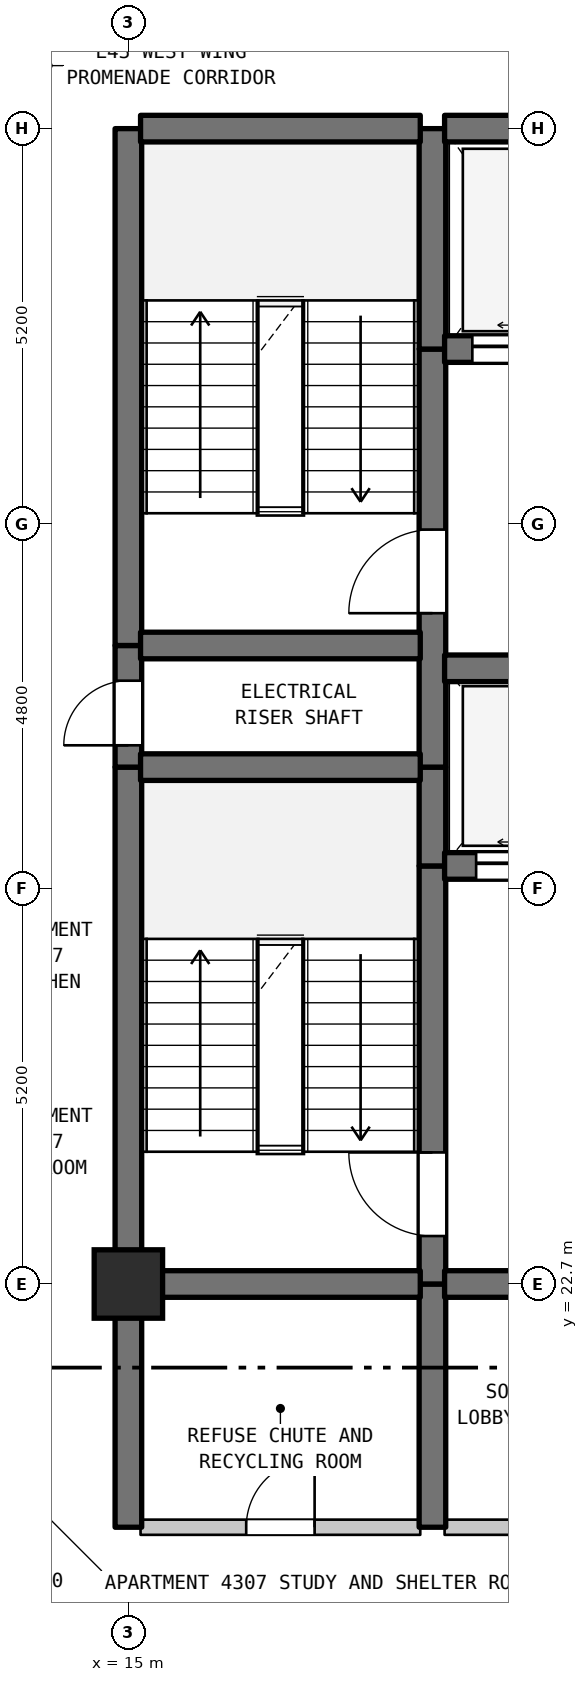
"""IFC4 building model, lengths in metres.
Left out: names, types, materials, properties, quantities, classifications, styles, units other than length and angle.
Written with IfcOpenShell. Run it as: python <this file> out.ifc"""

import sys

from ifc_helpers import new_model, si_unit, direction, frame, frame_2d, origin, origin_2d, place, context, subcontext, project, spatial, rectangle, extrude, element, fill, save


model = new_model("IFC4")
c1 = context("Model", 3, precision=1e-05, world=origin(), true_north=direction((0.0, 1.0)))
c2 = subcontext(c1, "Body", "Model", "MODEL_VIEW")
j1 = project(units=[si_unit("LENGTHUNIT", "METRE"), si_unit("PLANEANGLEUNIT", "RADIAN")], contexts=[c1])
p1 = place(None, origin())
s1 = spatial("IfcSite", under=j1, at=p1, CompositionType="ELEMENT")
p2 = place(p1, origin())
s2 = spatial("IfcBuilding", under=s1, at=p2, CompositionType="ELEMENT")
p3 = place(p2, frame((0.0, 0.0, 176.5)))
s3 = spatial("IfcBuildingStorey", under=s2, at=p3, CompositionType="ELEMENT", Elevation=176.5)
p4 = place(p3, frame((15.0, 22.7, 0.0), z_axis=(0.0, 0.0, 1.0), x_axis=(1.0, 0.0, 0.0)))
e1 = element("IfcColumn", 1, at=p4, inside=s3, PredefinedType="COLUMN", context=c2, shape_type="SweptSolid", body=[
    extrude(rectangle(XDim=0.9, YDim=0.9, at=origin_2d()), origin(), (0.0, 0.0, 1.0), 3.7),
])
p5 = place(p3, frame((15.0, 19.5, 0.0), z_axis=(0.0, 0.0, 1.0), x_axis=(0.0, 1.0, 0.0)))
e2 = element("IfcWall", 2, at=p5, inside=s3, PredefinedType="SHEAR", context=c2, shape_type="SweptSolid", body=[
    extrude(rectangle(XDim=3.2, YDim=0.35, at=frame_2d((1.6, 0.0))), origin(), (0.0, 0.0, 1.0), 3.39),
])
p6 = place(p3, frame((15.0, 22.7, 0.0), z_axis=(0.0, 0.0, 1.0), x_axis=(0.0, 1.0, 0.0)))
e3 = element("IfcWall", 3, at=p6, inside=s3, PredefinedType="SHEAR", context=c2, shape_type="SweptSolid", body=[
    extrude(rectangle(XDim=6.8, YDim=0.35, at=frame_2d((3.4, 0.0))), origin(), (0.0, 0.0, 1.0), 3.39),
])
p7 = place(p3, frame((15.0, 29.5, 0.0), z_axis=(0.0, 0.0, 1.0), x_axis=(0.0, 1.0, 0.0)))
e4 = element("IfcWall", 4, at=p7, inside=s3, PredefinedType="SHEAR", context=c2, shape_type="SweptSolid", body=[
    extrude(rectangle(XDim=1.6, YDim=0.35, at=frame_2d((0.8, 0.0))), origin(), (0.0, 0.0, 1.0), 3.39),
])
p8 = place(p7, frame((0.287, 0.0, 0.0)))
e5 = element("IfcOpeningElement", 5, at=p8, cuts=e4, PredefinedType="OPENING", context=c2, shape_type="SweptSolid", body=[
    extrude(rectangle(XDim=0.85, YDim=2.1, at=frame_2d((0.425, 1.05))), frame((0.0, 0.185, 0.0), z_axis=(0.0, -1.0, 0.0), x_axis=(1.0, 0.0, 0.0)), (0.0, 0.0, 1.0), 0.37),
])
p9 = place(p3, frame((15.0, 31.1, 0.0), z_axis=(0.0, 0.0, 1.0), x_axis=(0.0, 1.0, 0.0)))
e6 = element("IfcWall", 6, at=p9, inside=s3, PredefinedType="SHEAR", context=c2, shape_type="SweptSolid", body=[
    extrude(rectangle(XDim=6.8, YDim=0.35, at=frame_2d((3.4, 0.0))), origin(), (0.0, 0.0, 1.0), 3.39),
])
p10 = place(p3, frame((19.0, 19.5, 0.0), z_axis=(0.0, 0.0, 1.0), x_axis=(0.0, 1.0, 0.0)))
e7 = element("IfcWall", 7, at=p10, inside=s3, PredefinedType="SHEAR", context=c2, shape_type="SweptSolid", body=[
    extrude(rectangle(XDim=3.2, YDim=0.35, at=frame_2d((1.6, 0.0))), origin(), (0.0, 0.0, 1.0), 3.39),
])
p11 = place(p3, frame((19.0, 22.7, 0.0), z_axis=(0.0, 0.0, 1.0), x_axis=(0.0, 1.0, 0.0)))
e8 = element("IfcWall", 8, at=p11, inside=s3, PredefinedType="SHEAR", context=c2, shape_type="SweptSolid", body=[
    extrude(rectangle(XDim=5.5, YDim=0.35, at=frame_2d((2.75, 0.0))), origin(), (0.0, 0.0, 1.0), 3.39),
])
p12 = place(p11, frame((0.631, 0.0, 0.0)))
e9 = element("IfcOpeningElement", 9, at=p12, cuts=e8, PredefinedType="OPENING", context=c2, shape_type="SweptSolid", body=[
    extrude(rectangle(XDim=1.1, YDim=2.15, at=frame_2d((0.55, 1.075))), frame((0.0, 0.185, 0.0), z_axis=(0.0, -1.0, 0.0), x_axis=(1.0, 0.0, 0.0)), (0.0, 0.0, 1.0), 0.37),
])
p13 = place(p3, frame((19.0, 28.2, 0.0), z_axis=(0.0, 0.0, 1.0), x_axis=(0.0, 1.0, 0.0)))
e10 = element("IfcWall", 10, at=p13, inside=s3, PredefinedType="SHEAR", context=c2, shape_type="SweptSolid", body=[
    extrude(rectangle(XDim=1.3, YDim=0.35, at=frame_2d((0.65, 0.0))), origin(), (0.0, 0.0, 1.0), 3.39),
])
p14 = place(p3, frame((19.0, 29.5, 0.0), z_axis=(0.0, 0.0, 1.0), x_axis=(0.0, 1.0, 0.0)))
e11 = element("IfcWall", 11, at=p14, inside=s3, PredefinedType="SHEAR", context=c2, shape_type="SweptSolid", body=[
    extrude(rectangle(XDim=5.5, YDim=0.35, at=frame_2d((2.75, 0.0))), origin(), (0.0, 0.0, 1.0), 3.39),
])
p15 = place(p14, frame((2.025, 0.0, 0.0)))
e12 = element("IfcOpeningElement", 12, at=p15, cuts=e11, PredefinedType="OPENING", context=c2, shape_type="SweptSolid", body=[
    extrude(rectangle(XDim=1.1, YDim=2.15, at=frame_2d((0.55, 1.075))), frame((0.0, 0.185, 0.0), z_axis=(0.0, -1.0, 0.0), x_axis=(1.0, 0.0, 0.0)), (0.0, 0.0, 1.0), 0.37),
])
p16 = place(p3, frame((19.0, 35.0, 0.0), z_axis=(0.0, 0.0, 1.0), x_axis=(0.0, 1.0, 0.0)))
e13 = element("IfcWall", 13, at=p16, inside=s3, PredefinedType="SHEAR", context=c2, shape_type="SweptSolid", body=[
    extrude(rectangle(XDim=2.9, YDim=0.35, at=frame_2d((1.45, 0.0))), origin(), (0.0, 0.0, 1.0), 3.39),
])
p17 = place(p3, frame((15.16, 19.5, 0.0), z_axis=(0.0, 0.0, 1.0), x_axis=(1.0, 0.0, 0.0)))
e14 = element("IfcWall", 14, at=p17, inside=s3, PredefinedType="STANDARD", context=c2, shape_type="SweptSolid", body=[
    extrude(rectangle(XDim=3.68, YDim=0.2, at=frame_2d((1.84, 0.0))), origin(), (0.0, 0.0, 1.0), 3.39),
])
p18 = place(p17, frame((1.39, 0.0, 0.0)))
e15 = element("IfcOpeningElement", 15, at=p18, cuts=e14, PredefinedType="OPENING", context=c2, shape_type="SweptSolid", body=[
    extrude(rectangle(XDim=0.9, YDim=2.15, at=frame_2d((0.45, 1.075))), frame((0.0, 0.11, 0.0), z_axis=(0.0, -1.0, 0.0), x_axis=(1.0, 0.0, 0.0)), (0.0, 0.0, 1.0), 0.22),
])
p19 = place(p3, frame((19.16, 19.5, 0.0), z_axis=(0.0, 0.0, 1.0), x_axis=(1.0, 0.0, 0.0)))
e16 = element("IfcWall", 16, at=p19, inside=s3, PredefinedType="STANDARD", context=c2, shape_type="SweptSolid", body=[
    extrude(rectangle(XDim=4.48, YDim=0.2, at=frame_2d((2.24, 0.0))), origin(), (0.0, 0.0, 1.0), 3.39),
])
p20 = place(p19, frame((1.64, 0.0, 0.0)))
e17 = element("IfcOpeningElement", 17, at=p20, cuts=e16, PredefinedType="OPENING", context=c2, shape_type="SweptSolid", body=[
    extrude(rectangle(XDim=1.2, YDim=2.2, at=frame_2d((0.6, 1.1))), frame((0.0, 0.11, 0.0), z_axis=(0.0, -1.0, 0.0), x_axis=(1.0, 0.0, 0.0)), (0.0, 0.0, 1.0), 0.22),
])
p21 = place(p3, frame((15.16, 22.7, 0.0), z_axis=(0.0, 0.0, 1.0), x_axis=(1.0, 0.0, 0.0)))
e18 = element("IfcWall", 18, at=p21, inside=s3, PredefinedType="SHEAR", context=c2, shape_type="SweptSolid", body=[
    extrude(rectangle(XDim=3.68, YDim=0.35, at=frame_2d((1.84, 0.0))), origin(), (0.0, 0.0, 1.0), 3.39),
])
p22 = place(p3, frame((19.16, 22.7, 0.0), z_axis=(0.0, 0.0, 1.0), x_axis=(1.0, 0.0, 0.0)))
e19 = element("IfcWall", 19, at=p22, inside=s3, PredefinedType="SHEAR", context=c2, shape_type="SweptSolid", body=[
    extrude(rectangle(XDim=4.48, YDim=0.35, at=frame_2d((2.24, 0.0))), origin(), (0.0, 0.0, 1.0), 3.39),
])
p23 = place(p22, frame((1.64, 0.0, 0.0)))
e20 = element("IfcOpeningElement", 20, at=p23, cuts=e19, PredefinedType="OPENING", context=c2, shape_type="SweptSolid", body=[
    extrude(rectangle(XDim=1.2, YDim=2.2, at=frame_2d((0.6, 1.1))), frame((0.0, 0.185, 0.0), z_axis=(0.0, -1.0, 0.0), x_axis=(1.0, 0.0, 0.0)), (0.0, 0.0, 1.0), 0.37),
])
p24 = place(p3, frame((19.16, 28.2, 0.0), z_axis=(0.0, 0.0, 1.0), x_axis=(1.0, 0.0, 0.0)))
e21 = element("IfcWall", 21, at=p24, inside=s3, PredefinedType="SHEAR", context=c2, shape_type="SweptSolid", body=[
    extrude(rectangle(XDim=4.48, YDim=0.35, at=frame_2d((2.24, 0.0))), origin(), (0.0, 0.0, 1.0), 3.39),
])
p25 = place(p24, frame((0.415, 0.0, 0.0)))
e22 = element("IfcOpeningElement", 22, at=p25, cuts=e21, PredefinedType="OPENING", context=c2, shape_type="SweptSolid", body=[
    extrude(rectangle(XDim=1.25, YDim=2.2, at=frame_2d((0.625, 1.1))), frame((0.0, 0.185, 0.0), z_axis=(0.0, -1.0, 0.0), x_axis=(1.0, 0.0, 0.0)), (0.0, 0.0, 1.0), 0.37),
])
p26 = place(p24, frame((2.815, 0.0, 0.0)))
e23 = element("IfcOpeningElement", 23, at=p26, cuts=e21, PredefinedType="OPENING", context=c2, shape_type="SweptSolid", body=[
    extrude(rectangle(XDim=1.25, YDim=2.2, at=frame_2d((0.625, 1.1))), frame((0.0, 0.185, 0.0), z_axis=(0.0, -1.0, 0.0), x_axis=(1.0, 0.0, 0.0)), (0.0, 0.0, 1.0), 0.37),
])
p27 = place(p3, frame((15.16, 29.5, 0.0), z_axis=(0.0, 0.0, 1.0), x_axis=(1.0, 0.0, 0.0)))
e24 = element("IfcWall", 24, at=p27, inside=s3, PredefinedType="SHEAR", context=c2, shape_type="SweptSolid", body=[
    extrude(rectangle(XDim=3.68, YDim=0.35, at=frame_2d((1.84, 0.0))), origin(), (0.0, 0.0, 1.0), 3.39),
])
p28 = place(p3, frame((19.16, 30.8, 0.0), z_axis=(0.0, 0.0, 1.0), x_axis=(1.0, 0.0, 0.0)))
e25 = element("IfcWall", 25, at=p28, inside=s3, PredefinedType="SHEAR", context=c2, shape_type="SweptSolid", body=[
    extrude(rectangle(XDim=4.48, YDim=0.35, at=frame_2d((2.24, 0.0))), origin(), (0.0, 0.0, 1.0), 3.39),
])
p29 = place(p3, frame((15.16, 31.1, 0.0), z_axis=(0.0, 0.0, 1.0), x_axis=(1.0, 0.0, 0.0)))
e26 = element("IfcWall", 26, at=p29, inside=s3, PredefinedType="SHEAR", context=c2, shape_type="SweptSolid", body=[
    extrude(rectangle(XDim=3.68, YDim=0.35, at=frame_2d((1.84, 0.0))), origin(), (0.0, 0.0, 1.0), 3.39),
])
p30 = place(p3, frame((19.16, 35.0, 0.0), z_axis=(0.0, 0.0, 1.0), x_axis=(1.0, 0.0, 0.0)))
e27 = element("IfcWall", 27, at=p30, inside=s3, PredefinedType="SHEAR", context=c2, shape_type="SweptSolid", body=[
    extrude(rectangle(XDim=4.48, YDim=0.35, at=frame_2d((2.24, 0.0))), origin(), (0.0, 0.0, 1.0), 3.39),
])
p31 = place(p30, frame((0.365, 0.0, 0.0)))
e28 = element("IfcOpeningElement", 28, at=p31, cuts=e27, PredefinedType="OPENING", context=c2, shape_type="SweptSolid", body=[
    extrude(rectangle(XDim=1.35, YDim=2.2, at=frame_2d((0.675, 1.1))), frame((0.0, 0.185, 0.0), z_axis=(0.0, -1.0, 0.0), x_axis=(1.0, 0.0, 0.0)), (0.0, 0.0, 1.0), 0.37),
])
p32 = place(p30, frame((2.765, 0.0, 0.0)))
e29 = element("IfcOpeningElement", 29, at=p32, cuts=e27, PredefinedType="OPENING", context=c2, shape_type="SweptSolid", body=[
    extrude(rectangle(XDim=1.35, YDim=2.2, at=frame_2d((0.675, 1.1))), frame((0.0, 0.185, 0.0), z_axis=(0.0, -1.0, 0.0), x_axis=(1.0, 0.0, 0.0)), (0.0, 0.0, 1.0), 0.37),
])
p33 = place(p3, frame((15.16, 37.9, 0.0), z_axis=(0.0, 0.0, 1.0), x_axis=(1.0, 0.0, 0.0)))
e30 = element("IfcWall", 30, at=p33, inside=s3, PredefinedType="SHEAR", context=c2, shape_type="SweptSolid", body=[
    extrude(rectangle(XDim=3.68, YDim=0.35, at=frame_2d((1.84, 0.0))), origin(), (0.0, 0.0, 1.0), 3.39),
])
p34 = place(p3, frame((19.16, 37.9, 0.0), z_axis=(0.0, 0.0, 1.0), x_axis=(1.0, 0.0, 0.0)))
e31 = element("IfcWall", 31, at=p34, inside=s3, PredefinedType="SHEAR", context=c2, shape_type="SweptSolid", body=[
    extrude(rectangle(XDim=4.48, YDim=0.35, at=frame_2d((2.24, 0.0))), origin(), (0.0, 0.0, 1.0), 3.39),
])
p35 = place(p8, origin())
e32 = element("IfcDoor", 32, at=p35, inside=s3, OperationType="SINGLE_SWING_LEFT", PredefinedType="DOOR", context=c2, shape_type="SweptSolid", body=[
    extrude(rectangle(XDim=0.85, YDim=2.1, at=frame_2d((0.425, 1.05))), frame((0.0, 0.025, 0.0), z_axis=(0.0, -1.0, 0.0), x_axis=(1.0, 0.0, 0.0)), (0.0, 0.0, 1.0), 0.05),
])
fill(e5, e32)
p36 = place(p12, origin())
e33 = element("IfcDoor", 33, at=p36, inside=s3, OperationType="SINGLE_SWING_RIGHT", PredefinedType="DOOR", context=c2, shape_type="SweptSolid", body=[
    extrude(rectangle(XDim=1.1, YDim=2.15, at=frame_2d((0.55, 1.075))), frame((0.0, 0.025, 0.0), z_axis=(0.0, -1.0, 0.0), x_axis=(1.0, 0.0, 0.0)), (0.0, 0.0, 1.0), 0.05),
])
fill(e9, e33)
p37 = place(p15, origin())
e34 = element("IfcDoor", 34, at=p37, inside=s3, OperationType="SINGLE_SWING_LEFT", PredefinedType="DOOR", context=c2, shape_type="SweptSolid", body=[
    extrude(rectangle(XDim=1.1, YDim=2.15, at=frame_2d((0.55, 1.075))), frame((0.0, 0.025, 0.0), z_axis=(0.0, -1.0, 0.0), x_axis=(1.0, 0.0, 0.0)), (0.0, 0.0, 1.0), 0.05),
])
fill(e12, e34)
p38 = place(p18, origin())
e35 = element("IfcDoor", 35, at=p38, inside=s3, OperationType="SINGLE_SWING_RIGHT", PredefinedType="DOOR", context=c2, shape_type="SweptSolid", body=[
    extrude(rectangle(XDim=0.9, YDim=2.15, at=frame_2d((0.45, 1.075))), frame((0.0, 0.025, 0.0), z_axis=(0.0, -1.0, 0.0), x_axis=(1.0, 0.0, 0.0)), (0.0, 0.0, 1.0), 0.05),
])
fill(e15, e35)
p39 = place(p25, origin())
e36 = element("IfcDoor", 36, at=p39, inside=s3, OperationType="DOUBLE_DOOR_SLIDING", PredefinedType="DOOR", context=c2, shape_type="SweptSolid", body=[
    extrude(rectangle(XDim=1.25, YDim=2.2, at=frame_2d((0.625, 1.1))), frame((0.0, 0.025, 0.0), z_axis=(0.0, -1.0, 0.0), x_axis=(1.0, 0.0, 0.0)), (0.0, 0.0, 1.0), 0.05),
])
fill(e22, e36)
p40 = place(p31, origin())
e37 = element("IfcDoor", 37, at=p40, inside=s3, OperationType="DOUBLE_DOOR_SLIDING", PredefinedType="DOOR", context=c2, shape_type="SweptSolid", body=[
    extrude(rectangle(XDim=1.35, YDim=2.2, at=frame_2d((0.675, 1.1))), frame((0.0, 0.025, 0.0), z_axis=(0.0, -1.0, 0.0), x_axis=(1.0, 0.0, 0.0)), (0.0, 0.0, 1.0), 0.05),
])
fill(e28, e37)
save(model, sys.argv[1])
